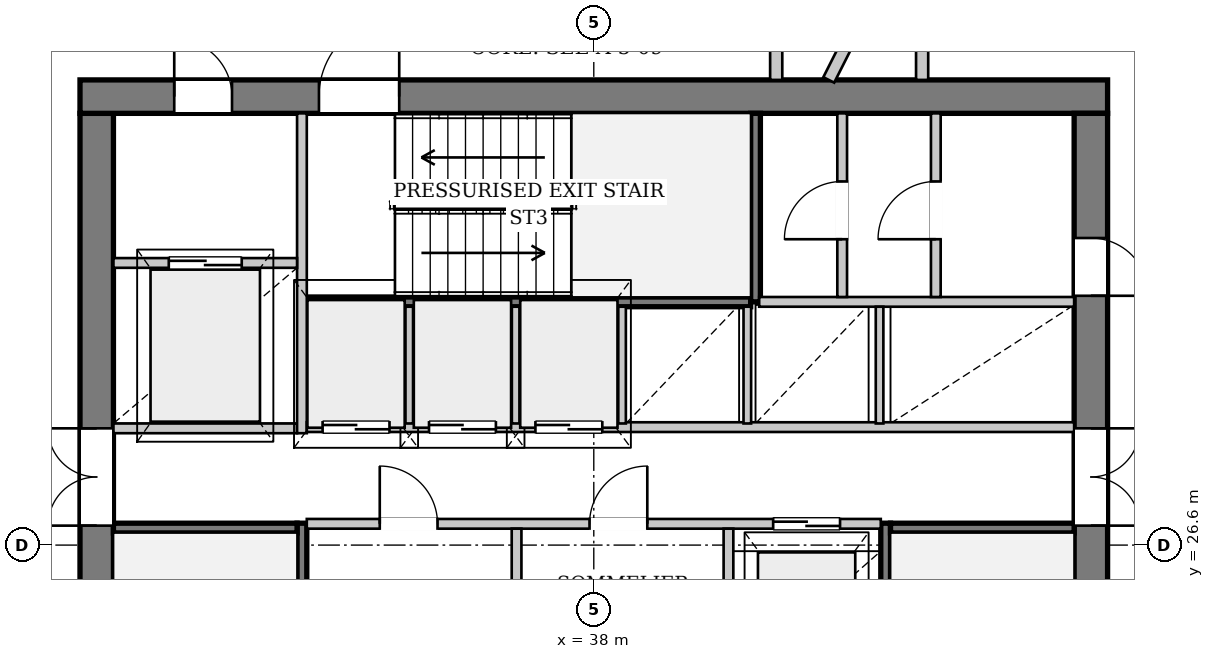
"""IFC4 building model, lengths in metres.
Left out: names, types, materials, properties, quantities, classifications, styles, units other than length and angle.
Written with IfcOpenShell. Run it as: python <this file> out.ifc"""

import sys

from ifc_helpers import new_model, si_unit, direction, frame, frame_2d, origin, place, context, subcontext, project, spatial, rectangle, extrude, source, transform, mapped, element, fill, save


model = new_model("IFC4")
c1 = context("Model", 3, precision=1e-05, world=origin(), true_north=direction((0.0, 1.0)))
c2 = subcontext(c1, "Body", "Model", "MODEL_VIEW")
j1 = project(units=[si_unit("LENGTHUNIT", "METRE"), si_unit("PLANEANGLEUNIT", "RADIAN")], contexts=[c1])
p1 = place(None, origin())
s1 = spatial("IfcSite", under=j1, at=p1, CompositionType="ELEMENT")
p2 = place(p1, origin())
s2 = spatial("IfcBuilding", under=s1, at=p2, CompositionType="ELEMENT")
p3 = place(p2, frame((0.0, 0.0, 164.35)))
s3 = spatial("IfcBuildingStorey", under=s2, at=p3, CompositionType="ELEMENT", Elevation=164.35)
p4 = place(p3, frame((29.825, 19.5, 0.0), z_axis=(0.0, 0.0, 1.0), x_axis=(0.0, 1.0, 0.0)))
e1 = element("IfcWall", 1, at=p4, inside=s3, PredefinedType="SHEAR", context=c2, shape_type="SweptSolid", body=[
    extrude(rectangle(XDim=14.2, YDim=0.55, at=frame_2d((7.1, 0.0))), origin(), (0.0, 0.0, 1.0), 3.33),
])
p5 = place(p4, frame((7.42, 0.0, 0.0)))
e2 = element("IfcOpeningElement", 2, at=p5, cuts=e1, PredefinedType="OPENING", context=c2, shape_type="SweptSolid", body=[
    extrude(rectangle(XDim=1.6, YDim=2.2, at=frame_2d((0.8, 1.1))), frame((0.0, 0.285, 0.0), z_axis=(0.0, -1.0, 0.0), x_axis=(1.0, 0.0, 0.0)), (0.0, 0.0, 1.0), 0.57),
])
p6 = place(p3, frame((29.55, 33.975, 0.0), z_axis=(0.0, 0.0, 1.0), x_axis=(1.0, 0.0, 0.0)))
e3 = element("IfcWall", 3, at=p6, inside=s3, PredefinedType="SHEAR", context=c2, shape_type="SweptSolid", body=[
    extrude(rectangle(XDim=16.9, YDim=0.55, at=frame_2d((8.45, 0.0))), origin(), (0.0, 0.0, 1.0), 3.33),
])
p7 = place(p6, frame((1.55, 0.0, 0.0)))
e4 = element("IfcOpeningElement", 4, at=p7, cuts=e3, PredefinedType="OPENING", context=c2, shape_type="SweptSolid", body=[
    extrude(rectangle(XDim=0.95, YDim=2.1, at=frame_2d((0.475, 1.05))), frame((0.0, 0.285, 0.0), z_axis=(0.0, -1.0, 0.0), x_axis=(1.0, 0.0, 0.0)), (0.0, 0.0, 1.0), 0.57),
])
p8 = place(p6, frame((3.93, 0.0, 0.0)))
e5 = element("IfcOpeningElement", 5, at=p8, cuts=e3, PredefinedType="OPENING", context=c2, shape_type="SweptSolid", body=[
    extrude(rectangle(XDim=1.32, YDim=2.2, at=frame_2d((0.66, 1.1))), frame((0.0, 0.285, 0.0), z_axis=(0.0, -1.0, 0.0), x_axis=(1.0, 0.0, 0.0)), (0.0, 0.0, 1.0), 0.57),
])
p9 = place(p3, frame((46.175, 33.7, 0.0), z_axis=(0.0, 0.0, 1.0), x_axis=(0.0, -1.0, 0.0)))
e6 = element("IfcWall", 6, at=p9, inside=s3, PredefinedType="SHEAR", context=c2, shape_type="SweptSolid", body=[
    extrude(rectangle(XDim=14.2, YDim=0.55, at=frame_2d((7.1, 0.0))), origin(), (0.0, 0.0, 1.0), 3.33),
])
p10 = place(p9, frame((5.18, 0.0, 0.0)))
e7 = element("IfcOpeningElement", 7, at=p10, cuts=e6, PredefinedType="OPENING", context=c2, shape_type="SweptSolid", body=[
    extrude(rectangle(XDim=1.6, YDim=2.2, at=frame_2d((0.8, 1.1))), frame((0.0, 0.285, 0.0), z_axis=(0.0, -1.0, 0.0), x_axis=(1.0, 0.0, 0.0)), (0.0, 0.0, 1.0), 0.57),
])
p11 = place(p9, frame((2.05, 0.0, 0.0)))
e8 = element("IfcOpeningElement", 8, at=p11, cuts=e6, PredefinedType="OPENING", context=c2, shape_type="SweptSolid", body=[
    extrude(rectangle(XDim=0.95, YDim=2.1, at=frame_2d((0.475, 1.05))), frame((0.0, 0.285, 0.0), z_axis=(0.0, -1.0, 0.0), x_axis=(1.0, 0.0, 0.0)), (0.0, 0.0, 1.0), 0.57),
])
p12 = place(p3, frame((33.2, 19.5, 0.0), z_axis=(0.0, 0.0, 1.0), x_axis=(0.0, 1.0, 0.0)))
e9 = element("IfcWall", 9, at=p12, inside=s3, PredefinedType="PARTITIONING", context=c2, shape_type="SweptSolid", body=[
    extrude(rectangle(XDim=7.46, YDim=0.16, at=frame_2d((3.73, 0.0))), origin(), (0.0, 0.0, 1.0), 3.33),
])
p13 = place(p12, frame((0.08, 0.0, 0.0)))
e10 = element("IfcOpeningElement", 10, at=p13, cuts=e9, PredefinedType="OPENING", context=c2, shape_type="SweptSolid", body=[
    extrude(rectangle(XDim=1.32, YDim=2.2, at=frame_2d((0.66, 1.1))), frame((0.0, 0.09, 0.0), z_axis=(0.0, -1.0, 0.0), x_axis=(1.0, 0.0, 0.0)), (0.0, 0.0, 1.0), 0.18),
])
p14 = place(p3, frame((30.1, 26.88, 0.0), z_axis=(0.0, 0.0, 1.0), x_axis=(1.0, 0.0, 0.0)))
e11 = element("IfcWall", 11, at=p14, inside=s3, PredefinedType="PARTITIONING", context=c2, shape_type="SweptSolid", body=[
    extrude(rectangle(XDim=3.02, YDim=0.16, at=frame_2d((1.51, 0.0))), origin(), (0.0, 0.0, 1.0), 3.33),
])
p15 = place(p3, frame((42.8, 26.96, 0.0), z_axis=(0.0, 0.0, 1.0), x_axis=(0.0, -1.0, 0.0)))
e12 = element("IfcWall", 12, at=p15, inside=s3, PredefinedType="PARTITIONING", context=c2, shape_type="SweptSolid", body=[
    extrude(rectangle(XDim=7.46, YDim=0.16, at=frame_2d((3.73, 0.0))), origin(), (0.0, 0.0, 1.0), 3.33),
])
p16 = place(p15, frame((6.06, 0.0, 0.0)))
e13 = element("IfcOpeningElement", 13, at=p16, cuts=e12, PredefinedType="OPENING", context=c2, shape_type="SweptSolid", body=[
    extrude(rectangle(XDim=1.32, YDim=2.2, at=frame_2d((0.66, 1.1))), frame((0.0, 0.09, 0.0), z_axis=(0.0, -1.0, 0.0), x_axis=(1.0, 0.0, 0.0)), (0.0, 0.0, 1.0), 0.18),
])
p17 = place(p3, frame((42.88, 26.88, 0.0), z_axis=(0.0, 0.0, 1.0), x_axis=(1.0, 0.0, 0.0)))
e14 = element("IfcWall", 14, at=p17, inside=s3, PredefinedType="PARTITIONING", context=c2, shape_type="SweptSolid", body=[
    extrude(rectangle(XDim=3.02, YDim=0.16, at=frame_2d((1.51, 0.0))), origin(), (0.0, 0.0, 1.0), 3.33),
])
p18 = place(p3, frame((33.28, 30.6, 0.0), z_axis=(0.0, 0.0, 1.0), x_axis=(1.0, 0.0, 0.0)))
e15 = element("IfcWall", 15, at=p18, inside=s3, PredefinedType="PARTITIONING", context=c2, shape_type="SweptSolid", body=[
    extrude(rectangle(XDim=7.3, YDim=0.16, at=frame_2d((3.65, 0.0))), origin(), (0.0, 0.0, 1.0), 3.33),
])
p19 = place(p3, frame((40.66, 30.6, 0.0), z_axis=(0.0, 0.0, 1.0), x_axis=(0.0, 1.0, 0.0)))
e16 = element("IfcWall", 16, at=p19, inside=s3, PredefinedType="PARTITIONING", context=c2, shape_type="SweptSolid", body=[
    extrude(rectangle(XDim=3.1, YDim=0.16, at=frame_2d((1.55, 0.0))), origin(), (0.0, 0.0, 1.0), 3.33),
])
p20 = place(p3, frame((30.1, 28.52, 0.0), z_axis=(0.0, 0.0, 1.0), x_axis=(1.0, 0.0, 0.0)))
e17 = element("IfcWall", 17, at=p20, inside=s3, PredefinedType="PARTITIONING", context=c2, shape_type="SweptSolid", body=[
    extrude(rectangle(XDim=3.02, YDim=0.16, at=frame_2d((1.51, 0.0))), origin(), (0.0, 0.0, 1.0), 3.33),
])
p21 = place(p3, frame((33.2, 28.44, 0.0), z_axis=(0.0, 0.0, 1.0), x_axis=(0.0, 1.0, 0.0)))
e18 = element("IfcWall", 18, at=p21, inside=s3, PredefinedType="PARTITIONING", context=c2, shape_type="SweptSolid", body=[
    extrude(rectangle(XDim=5.26, YDim=0.16, at=frame_2d((2.63, 0.0))), origin(), (0.0, 0.0, 1.0), 3.33),
])
p22 = place(p3, frame((30.1, 31.24, 0.0), z_axis=(0.0, 0.0, 1.0), x_axis=(1.0, 0.0, 0.0)))
e19 = element("IfcWall", 19, at=p22, inside=s3, PredefinedType="PARTITIONING", context=c2, shape_type="SweptSolid", body=[
    extrude(rectangle(XDim=3.02, YDim=0.16, at=frame_2d((1.51, 0.0))), origin(), (0.0, 0.0, 1.0), 3.33),
])
p23 = place(p22, frame((0.91, 0.0, 0.0)))
e20 = element("IfcOpeningElement", 20, at=p23, cuts=e19, PredefinedType="OPENING", context=c2, shape_type="SweptSolid", body=[
    extrude(rectangle(XDim=1.2, YDim=2.2, at=frame_2d((0.6, 1.1))), frame((0.0, 0.09, 0.0), z_axis=(0.0, -1.0, 0.0), x_axis=(1.0, 0.0, 0.0)), (0.0, 0.0, 1.0), 0.18),
])
p24 = place(p3, frame((33.28, 26.95, 0.0), z_axis=(0.0, 0.0, 1.0), x_axis=(1.0, 0.0, 0.0)))
e21 = element("IfcWall", 21, at=p24, inside=s3, PredefinedType="PARTITIONING", context=c2, shape_type="SweptSolid", body=[
    extrude(rectangle(XDim=9.44, YDim=0.16, at=frame_2d((4.72, 0.0))), origin(), (0.0, 0.0, 1.0), 3.33),
])
p25 = place(p24, frame((1.2, 0.0, 0.0)))
e22 = element("IfcOpeningElement", 22, at=p25, cuts=e21, PredefinedType="OPENING", context=c2, shape_type="SweptSolid", body=[
    extrude(rectangle(XDim=0.95, YDim=2.1, at=frame_2d((0.475, 1.05))), frame((0.0, 0.09, 0.0), z_axis=(0.0, -1.0, 0.0), x_axis=(1.0, 0.0, 0.0)), (0.0, 0.0, 1.0), 0.18),
])
p26 = place(p24, frame((4.65, 0.0, 0.0)))
e23 = element("IfcOpeningElement", 23, at=p26, cuts=e21, PredefinedType="OPENING", context=c2, shape_type="SweptSolid", body=[
    extrude(rectangle(XDim=0.95, YDim=2.1, at=frame_2d((0.475, 1.05))), frame((0.0, 0.09, 0.0), z_axis=(0.0, -1.0, 0.0), x_axis=(1.0, 0.0, 0.0)), (0.0, 0.0, 1.0), 0.18),
])
p27 = place(p24, frame((7.67, 0.0, 0.0)))
e24 = element("IfcOpeningElement", 24, at=p27, cuts=e21, PredefinedType="OPENING", context=c2, shape_type="SweptSolid", body=[
    extrude(rectangle(XDim=1.1, YDim=2.2, at=frame_2d((0.55, 1.1))), frame((0.0, 0.09, 0.0), z_axis=(0.0, -1.0, 0.0), x_axis=(1.0, 0.0, 0.0)), (0.0, 0.0, 1.0), 0.18),
])
for number, where, z_axis, x_axis in (
    (25, (36.73, 24.56, 0.0), (0.0, 0.0, 1.0), (0.0, 1.0, 0.0)),
    (26, (40.215, 24.56, 0.0), (0.0, 0.0, 1.0), (0.0, 1.0, 0.0)),
):
    element("IfcWall", number, at=place(p3, frame(where, z_axis=z_axis, x_axis=x_axis)), inside=s3, PredefinedType="PARTITIONING", context=c2, shape_type="SweptSolid", body=[
        extrude(rectangle(XDim=2.31, YDim=0.16, at=frame_2d((1.155, 0.0))), origin(), (0.0, 0.0, 1.0), 3.33),
    ])
p28 = place(p3, frame((33.28, 28.54, 0.0), z_axis=(0.0, 0.0, 1.0), x_axis=(1.0, 0.0, 0.0)))
e27 = element("IfcWall", 27, at=p28, inside=s3, PredefinedType="PARTITIONING", context=c2, shape_type="SweptSolid", body=[
    extrude(rectangle(XDim=12.62, YDim=0.16, at=frame_2d((6.31, 0.0))), origin(), (0.0, 0.0, 1.0), 3.33),
])
p29 = place(p28, frame((0.26, 0.0, 0.0)))
e28 = element("IfcOpeningElement", 28, at=p29, cuts=e27, PredefinedType="OPENING", context=c2, shape_type="SweptSolid", body=[
    extrude(rectangle(XDim=1.1, YDim=2.2, at=frame_2d((0.55, 1.1))), frame((0.0, 0.09, 0.0), z_axis=(0.0, -1.0, 0.0), x_axis=(1.0, 0.0, 0.0)), (0.0, 0.0, 1.0), 0.18),
])
p30 = place(p28, frame((2.01, 0.0, 0.0)))
e29 = element("IfcOpeningElement", 29, at=p30, cuts=e27, PredefinedType="OPENING", context=c2, shape_type="SweptSolid", body=[
    extrude(rectangle(XDim=1.1, YDim=2.2, at=frame_2d((0.55, 1.1))), frame((0.0, 0.09, 0.0), z_axis=(0.0, -1.0, 0.0), x_axis=(1.0, 0.0, 0.0)), (0.0, 0.0, 1.0), 0.18),
])
p31 = place(p28, frame((3.76, 0.0, 0.0)))
e30 = element("IfcOpeningElement", 30, at=p31, cuts=e27, PredefinedType="OPENING", context=c2, shape_type="SweptSolid", body=[
    extrude(rectangle(XDim=1.1, YDim=2.2, at=frame_2d((0.55, 1.1))), frame((0.0, 0.09, 0.0), z_axis=(0.0, -1.0, 0.0), x_axis=(1.0, 0.0, 0.0)), (0.0, 0.0, 1.0), 0.18),
])
p32 = place(p3, frame((40.72, 30.6, 0.0), z_axis=(0.0, 0.0, 1.0), x_axis=(1.0, 0.0, 0.0)))
e31 = element("IfcWall", 31, at=p32, inside=s3, PredefinedType="PARTITIONING", context=c2, shape_type="SweptSolid", body=[
    extrude(rectangle(XDim=5.18, YDim=0.16, at=frame_2d((2.59, 0.0))), origin(), (0.0, 0.0, 1.0), 3.33),
])
for number, where, z_axis, x_axis in (
    (32, (34.965, 28.6, 0.0), (0.0, 0.0, 1.0), (0.0, 1.0, 0.0)),
    (33, (36.715, 28.6, 0.0), (0.0, 0.0, 1.0), (0.0, 1.0, 0.0)),
    (34, (38.465, 28.6, 0.0), (0.0, 0.0, 1.0), (0.0, 1.0, 0.0)),
    (35, (40.525, 28.6, 0.0), (0.0, 0.0, 1.0), (0.0, 1.0, 0.0)),
    (36, (42.7, 28.6, 0.0), (0.0, 0.0, 1.0), (0.0, 1.0, 0.0)),
):
    element("IfcWall", number, at=place(p3, frame(where, z_axis=z_axis, x_axis=x_axis)), inside=s3, PredefinedType="PARTITIONING", context=c2, shape_type="SweptSolid", body=[
        extrude(rectangle(XDim=1.92, YDim=0.125, at=frame_2d((0.96, 0.0))), origin(), (0.0, 0.0, 1.0), 3.33),
    ])
p33 = place(p3, frame((42.085, 30.68, 0.0), z_axis=(0.0, 0.0, 1.0), x_axis=(0.0, 1.0, 0.0)))
e37 = element("IfcWall", 37, at=p33, inside=s3, PredefinedType="PARTITIONING", context=c2, shape_type="SweptSolid", body=[
    extrude(rectangle(XDim=3.02, YDim=0.16, at=frame_2d((1.51, 0.0))), origin(), (0.0, 0.0, 1.0), 3.33),
])
p34 = place(p33, frame((0.95, 0.0, 0.0)))
e38 = element("IfcOpeningElement", 38, at=p34, cuts=e37, PredefinedType="OPENING", context=c2, shape_type="SweptSolid", body=[
    extrude(rectangle(XDim=0.95, YDim=2.1, at=frame_2d((0.475, 1.05))), frame((0.0, 0.09, 0.0), z_axis=(0.0, -1.0, 0.0), x_axis=(1.0, 0.0, 0.0)), (0.0, 0.0, 1.0), 0.18),
])
p35 = place(p3, frame((43.625, 30.68, 0.0), z_axis=(0.0, 0.0, 1.0), x_axis=(0.0, 1.0, 0.0)))
e39 = element("IfcWall", 39, at=p35, inside=s3, PredefinedType="PARTITIONING", context=c2, shape_type="SweptSolid", body=[
    extrude(rectangle(XDim=3.02, YDim=0.16, at=frame_2d((1.51, 0.0))), origin(), (0.0, 0.0, 1.0), 3.33),
])
p36 = place(p35, frame((0.95, 0.0, 0.0)))
e40 = element("IfcOpeningElement", 40, at=p36, cuts=e39, PredefinedType="OPENING", context=c2, shape_type="SweptSolid", body=[
    extrude(rectangle(XDim=0.95, YDim=2.1, at=frame_2d((0.475, 1.05))), frame((0.0, 0.09, 0.0), z_axis=(0.0, -1.0, 0.0), x_axis=(1.0, 0.0, 0.0)), (0.0, 0.0, 1.0), 0.18),
])
p37 = place(p3, frame((41.864, 34.25, 0.0), z_axis=(0.0, 0.0, 1.0), x_axis=(0.450889382552, 0.892579836598, 0.0)))
e41 = element("IfcWall", 41, at=p37, inside=s3, PredefinedType="PARTITIONING", context=c2, shape_type="SweptSolid", body=[
    extrude(rectangle(XDim=10.324, YDim=0.2, at=frame_2d((5.162, 0.0))), origin(), (0.0, 0.0, 1.0), 3.33),
])
for number, where, z_axis, x_axis in (
    (42, (41.0, 34.25, 0.0), (0.0, 0.0, 1.0), (0.0, 1.0, 0.0)),
    (43, (43.4, 34.25, 0.0), (0.0, 0.0, 1.0), (0.0, 1.0, 0.0)),
):
    element("IfcWall", number, at=place(p3, frame(where, z_axis=z_axis, x_axis=x_axis)), inside=s3, PredefinedType="PARTITIONING", context=c2, shape_type="SweptSolid", body=[
        extrude(rectangle(XDim=1.95, YDim=0.2, at=frame_2d((0.975, 0.0))), origin(), (0.0, 0.0, 1.0), 3.33),
    ])
m1 = source(origin(), c2, "Body", "SweptSolid", [
    extrude(rectangle(XDim=1.6, YDim=2.2, at=frame_2d((0.8, 1.1))), frame((0.0, 0.025, 0.0), z_axis=(0.0, -1.0, 0.0), x_axis=(1.0, 0.0, 0.0)), (0.0, 0.0, 1.0), 0.05),
])
p38 = place(p5, origin())
e44 = element("IfcDoor", 44, at=p38, inside=s3, OperationType="DOUBLE_DOOR_SINGLE_SWING", PredefinedType="DOOR", context=c2, shape_type="MappedRepresentation", body=[
    mapped(m1, transform((0.0, 0.0, 0.0), x_axis=(1.0, 0.0, 0.0), y_axis=(0.0, 1.0, 0.0), z_axis=(0.0, 0.0, 1.0), scale=1.0)),
])
fill(e2, e44)
m2 = source(origin(), c2, "Body", "SweptSolid", [
    extrude(rectangle(XDim=0.95, YDim=2.1, at=frame_2d((0.475, 1.05))), frame((0.0, 0.025, 0.0), z_axis=(0.0, -1.0, 0.0), x_axis=(1.0, 0.0, 0.0)), (0.0, 0.0, 1.0), 0.05),
])
p39 = place(p7, origin())
e45 = element("IfcDoor", 45, at=p39, inside=s3, OperationType="SINGLE_SWING_LEFT", PredefinedType="DOOR", context=c2, shape_type="MappedRepresentation", body=[
    mapped(m2, transform((0.0, 0.0, 0.0), x_axis=(1.0, 0.0, 0.0), y_axis=(0.0, 1.0, 0.0), z_axis=(0.0, 0.0, 1.0), scale=1.0)),
])
fill(e4, e45)
m3 = source(origin(), c2, "Body", "SweptSolid", [
    extrude(rectangle(XDim=1.32, YDim=2.2, at=frame_2d((0.66, 1.1))), frame((0.0, 0.025, 0.0), z_axis=(0.0, -1.0, 0.0), x_axis=(1.0, 0.0, 0.0)), (0.0, 0.0, 1.0), 0.05),
])
p40 = place(p8, origin())
e46 = element("IfcDoor", 46, at=p40, inside=s3, OperationType="SINGLE_SWING_RIGHT", PredefinedType="DOOR", context=c2, shape_type="MappedRepresentation", body=[
    mapped(m3, transform((0.0, 0.0, 0.0), x_axis=(1.0, 0.0, 0.0), y_axis=(0.0, 1.0, 0.0), z_axis=(0.0, 0.0, 1.0), scale=1.0)),
])
fill(e5, e46)
p41 = place(p10, origin())
e47 = element("IfcDoor", 47, at=p41, inside=s3, OperationType="DOUBLE_DOOR_SINGLE_SWING", PredefinedType="DOOR", context=c2, shape_type="MappedRepresentation", body=[
    mapped(m1, transform((0.0, 0.0, 0.0), x_axis=(1.0, 0.0, 0.0), y_axis=(0.0, 1.0, 0.0), z_axis=(0.0, 0.0, 1.0), scale=1.0)),
])
fill(e7, e47)
m4 = source(origin(), c2, "Body", "SweptSolid", [
    extrude(rectangle(XDim=1.2, YDim=2.2, at=frame_2d((0.6, 1.1))), frame((0.0, 0.025, 0.0), z_axis=(0.0, -1.0, 0.0), x_axis=(1.0, 0.0, 0.0)), (0.0, 0.0, 1.0), 0.05),
])
p42 = place(p23, origin())
e48 = element("IfcDoor", 48, at=p42, inside=s3, OperationType="DOUBLE_DOOR_SLIDING", PredefinedType="DOOR", context=c2, shape_type="MappedRepresentation", body=[
    mapped(m4, transform((0.0, 0.0, 0.0), x_axis=(1.0, 0.0, 0.0), y_axis=(0.0, 1.0, 0.0), z_axis=(0.0, 0.0, 1.0), scale=1.0)),
])
fill(e20, e48)
p43 = place(p25, origin())
e49 = element("IfcDoor", 49, at=p43, inside=s3, OperationType="SINGLE_SWING_LEFT", PredefinedType="DOOR", context=c2, shape_type="MappedRepresentation", body=[
    mapped(m2, transform((0.0, 0.0, 0.0), x_axis=(1.0, 0.0, 0.0), y_axis=(0.0, 1.0, 0.0), z_axis=(0.0, 0.0, 1.0), scale=1.0)),
])
fill(e22, e49)
p44 = place(p26, origin())
e50 = element("IfcDoor", 50, at=p44, inside=s3, OperationType="SINGLE_SWING_RIGHT", PredefinedType="DOOR", context=c2, shape_type="MappedRepresentation", body=[
    mapped(m2, transform((0.0, 0.0, 0.0), x_axis=(1.0, 0.0, 0.0), y_axis=(0.0, 1.0, 0.0), z_axis=(0.0, 0.0, 1.0), scale=1.0)),
])
fill(e23, e50)
m5 = source(origin(), c2, "Body", "SweptSolid", [
    extrude(rectangle(XDim=1.1, YDim=2.2, at=frame_2d((0.55, 1.1))), frame((0.0, 0.025, 0.0), z_axis=(0.0, -1.0, 0.0), x_axis=(1.0, 0.0, 0.0)), (0.0, 0.0, 1.0), 0.05),
])
p45 = place(p27, origin())
e51 = element("IfcDoor", 51, at=p45, inside=s3, OperationType="DOUBLE_DOOR_SLIDING", PredefinedType="DOOR", context=c2, shape_type="MappedRepresentation", body=[
    mapped(m5, transform((0.0, 0.0, 0.0), x_axis=(1.0, 0.0, 0.0), y_axis=(0.0, 1.0, 0.0), z_axis=(0.0, 0.0, 1.0), scale=1.0)),
])
fill(e24, e51)
p46 = place(p29, origin())
e52 = element("IfcDoor", 52, at=p46, inside=s3, OperationType="DOUBLE_DOOR_SLIDING", PredefinedType="DOOR", context=c2, shape_type="MappedRepresentation", body=[
    mapped(m5, transform((0.0, 0.0, 0.0), x_axis=(1.0, 0.0, 0.0), y_axis=(0.0, 1.0, 0.0), z_axis=(0.0, 0.0, 1.0), scale=1.0)),
])
fill(e28, e52)
p47 = place(p30, origin())
e53 = element("IfcDoor", 53, at=p47, inside=s3, OperationType="DOUBLE_DOOR_SLIDING", PredefinedType="DOOR", context=c2, shape_type="MappedRepresentation", body=[
    mapped(m5, transform((0.0, 0.0, 0.0), x_axis=(1.0, 0.0, 0.0), y_axis=(0.0, 1.0, 0.0), z_axis=(0.0, 0.0, 1.0), scale=1.0)),
])
fill(e29, e53)
p48 = place(p31, origin())
e54 = element("IfcDoor", 54, at=p48, inside=s3, OperationType="DOUBLE_DOOR_SLIDING", PredefinedType="DOOR", context=c2, shape_type="MappedRepresentation", body=[
    mapped(m5, transform((0.0, 0.0, 0.0), x_axis=(1.0, 0.0, 0.0), y_axis=(0.0, 1.0, 0.0), z_axis=(0.0, 0.0, 1.0), scale=1.0)),
])
fill(e30, e54)
p49 = place(p34, origin())
e55 = element("IfcDoor", 55, at=p49, inside=s3, OperationType="SINGLE_SWING_LEFT", PredefinedType="DOOR", context=c2, shape_type="MappedRepresentation", body=[
    mapped(m2, transform((0.0, 0.0, 0.0), x_axis=(1.0, 0.0, 0.0), y_axis=(0.0, 1.0, 0.0), z_axis=(0.0, 0.0, 1.0), scale=1.0)),
])
fill(e38, e55)
p50 = place(p36, origin())
e56 = element("IfcDoor", 56, at=p50, inside=s3, OperationType="SINGLE_SWING_LEFT", PredefinedType="DOOR", context=c2, shape_type="MappedRepresentation", body=[
    mapped(m2, transform((0.0, 0.0, 0.0), x_axis=(1.0, 0.0, 0.0), y_axis=(0.0, 1.0, 0.0), z_axis=(0.0, 0.0, 1.0), scale=1.0)),
])
fill(e40, e56)
p51 = place(p11, origin())
e57 = element("IfcDoor", 57, at=p51, inside=s3, OperationType="SINGLE_SWING_RIGHT", PredefinedType="DOOR", context=c2, shape_type="MappedRepresentation", body=[
    mapped(m2, transform((0.0, 0.0, 0.0), x_axis=(1.0, 0.0, 0.0), y_axis=(0.0, 1.0, 0.0), z_axis=(0.0, 0.0, 1.0), scale=1.0)),
])
fill(e8, e57)
save(model, sys.argv[1])
